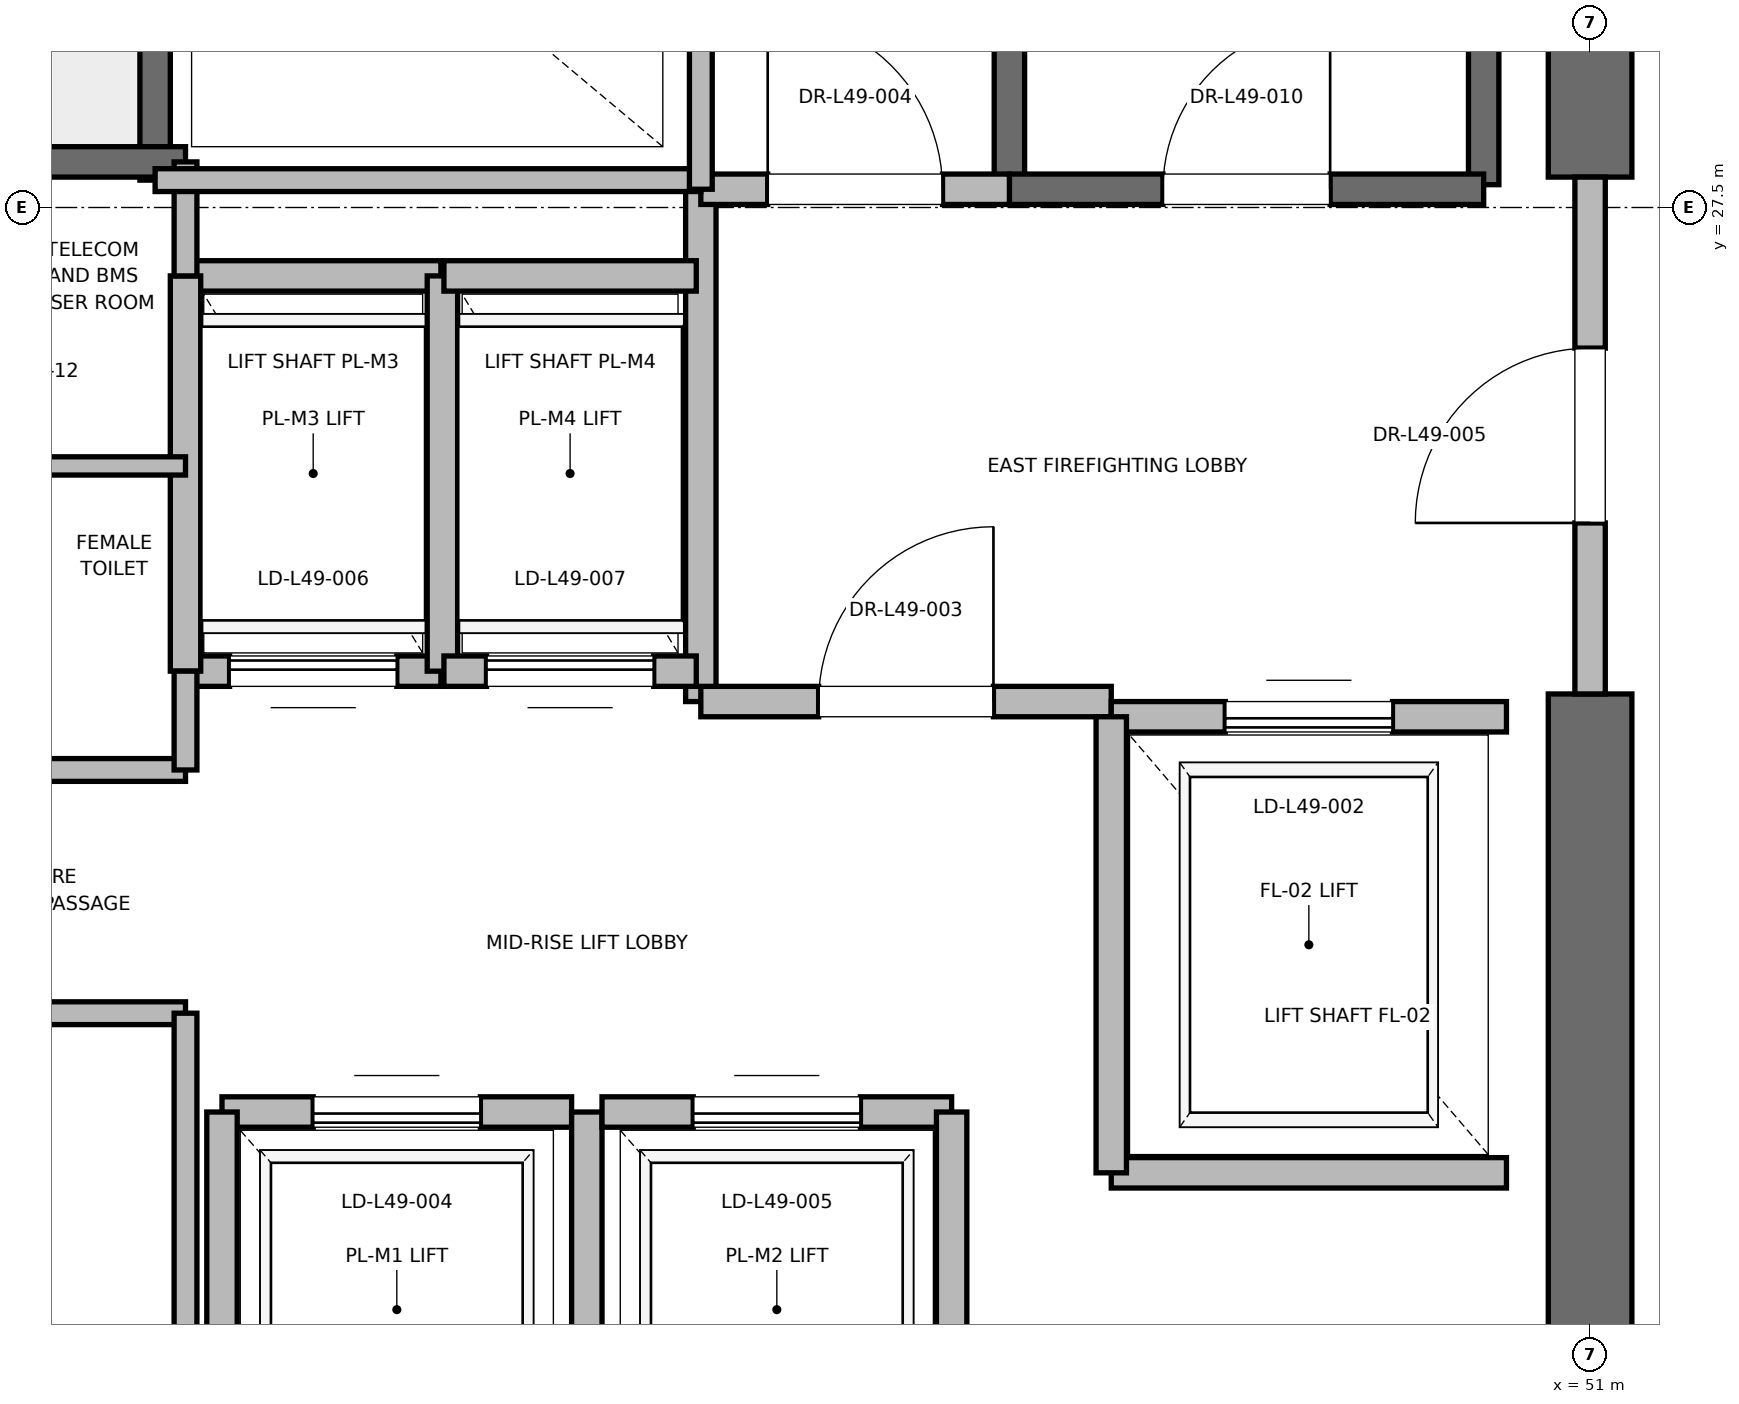
"""IFC4 building model, lengths in metres.
Left out: names, types, materials, properties, quantities, classifications, styles, units other than length and angle.
Written with IfcOpenShell. Run it as: python <this file> out.ifc"""

import sys

from ifc_helpers import new_model, si_unit, direction, frame, frame_2d, origin, place, context, subcontext, project, spatial, rectangle, extrude, element, fill, save


model = new_model("IFC4")
c1 = context("Model", 3, precision=1e-05, world=origin(), true_north=direction((0.0, 1.0)))
c2 = subcontext(c1, "Body", "Model", "MODEL_VIEW")
j1 = project(units=[si_unit("LENGTHUNIT", "METRE"), si_unit("PLANEANGLEUNIT", "RADIAN")], contexts=[c1])
p1 = place(None, origin())
s1 = spatial("IfcSite", under=j1, at=p1, CompositionType="ELEMENT")
p2 = place(p1, origin())
s2 = spatial("IfcBuilding", under=s1, at=p2, CompositionType="ELEMENT")
p3 = place(p2, frame((0.0, 0.0, 213.2)))
s3 = spatial("IfcBuildingStorey", under=s2, at=p3, CompositionType="ELEMENT", Elevation=213.2)
p4 = place(p3, frame((51.0, 18.5, 0.0), z_axis=(0.0, 0.0, 1.0), x_axis=(0.0, 1.0, 0.0)))
e1 = element("IfcWall", 1, at=p4, inside=s3, PredefinedType="SHEAR", context=c2, shape_type="SweptSolid", body=[
    extrude(rectangle(XDim=5.8, YDim=0.55, at=frame_2d((2.9, 0.0))), origin(), (0.0, 0.0, 1.0), 3.775),
])
p5 = place(p3, frame((51.0, 27.7, 0.0), z_axis=(0.0, 0.0, 1.0), x_axis=(0.0, 1.0, 0.0)))
e2 = element("IfcWall", 2, at=p5, inside=s3, PredefinedType="SHEAR", context=c2, shape_type="SweptSolid", body=[
    extrude(rectangle(XDim=8.8, YDim=0.55, at=frame_2d((4.4, 0.0))), origin(), (0.0, 0.0, 1.0), 3.775),
])
p6 = place(p3, frame((50.3, 27.65, 0.0), z_axis=(0.0, 0.0, 1.0), x_axis=(0.0, 1.0, 0.0)))
e3 = element("IfcWall", 3, at=p6, inside=s3, PredefinedType="SOLIDWALL", context=c2, shape_type="SweptSolid", body=[
    extrude(rectangle(XDim=8.15, YDim=0.2, at=frame_2d((4.075, 0.0))), origin(), (0.0, 0.0, 1.0), 3.775),
])
p7 = place(p3, frame((47.18, 27.62, 0.0), z_axis=(0.0, 0.0, 1.0), x_axis=(0.0, 1.0, 0.0)))
e4 = element("IfcWall", 4, at=p7, inside=s3, PredefinedType="SOLIDWALL", context=c2, shape_type="SweptSolid", body=[
    extrude(rectangle(XDim=8.18, YDim=0.2, at=frame_2d((4.09, 0.0))), origin(), (0.0, 0.0, 1.0), 3.775),
])
p8 = place(p3, frame((47.18, 27.62, 0.0), z_axis=(0.0, 0.0, 1.0), x_axis=(1.0, 0.0, 0.0)))
e5 = element("IfcWall", 5, at=p8, inside=s3, PredefinedType="SOLIDWALL", context=c2, shape_type="SweptSolid", body=[
    extrude(rectangle(XDim=3.12, YDim=0.2, at=frame_2d((1.56, 0.0))), origin(), (0.0, 0.0, 1.0), 3.775),
])
p9 = place(p8, frame((1.01, 0.0, 0.0)))
e6 = element("IfcOpeningElement", 6, at=p9, cuts=e5, PredefinedType="OPENING", context=c2, shape_type="SweptSolid", body=[
    extrude(rectangle(XDim=1.1, YDim=2.15, at=frame_2d((0.55, 1.075))), frame((0.0, 0.1, 0.0), z_axis=(0.0, -1.0, 0.0), x_axis=(1.0, 0.0, 0.0)), (0.0, 0.0, 1.0), 0.2),
])
p10 = place(p3, frame((41.56, 27.68, 0.0), z_axis=(0.0, 0.0, 1.0), x_axis=(0.0, 1.0, 0.0)))
e7 = element("IfcWall", 7, at=p10, inside=s3, PredefinedType="SOLIDWALL", context=c2, shape_type="SweptSolid", body=[
    extrude(rectangle(XDim=8.57, YDim=0.2, at=frame_2d((4.285, 0.0))), origin(), (0.0, 0.0, 1.0), 3.775),
])
p11 = place(p3, frame((38.44, 27.8, 0.0), z_axis=(0.0, 0.0, 1.0), x_axis=(1.0, 0.0, 0.0)))
e8 = element("IfcWall", 8, at=p11, inside=s3, PredefinedType="SOLIDWALL", context=c2, shape_type="SweptSolid", body=[
    extrude(rectangle(XDim=3.32, YDim=0.2, at=frame_2d((1.66, 0.0))), origin(), (0.0, 0.0, 1.0), 3.775),
])
p12 = place(p3, frame((45.15, 24.25, 0.0), z_axis=(0.0, 0.0, 1.0), x_axis=(0.0, 1.0, 0.0)))
e9 = element("IfcWall", 9, at=p12, inside=s3, PredefinedType="PARTITIONING", context=c2, shape_type="SweptSolid", body=[
    extrude(rectangle(XDim=3.37, YDim=0.2, at=frame_2d((1.685, 0.0))), origin(), (0.0, 0.0, 1.0), 3.775),
])
p13 = place(p3, frame((45.15, 24.25, 0.0), z_axis=(0.0, 0.0, 1.0), x_axis=(1.0, 0.0, 0.0)))
e10 = element("IfcWall", 10, at=p13, inside=s3, PredefinedType="PARTITIONING", context=c2, shape_type="SweptSolid", body=[
    extrude(rectangle(XDim=2.7, YDim=0.2, at=frame_2d((1.35, 0.0))), origin(), (0.0, 0.0, 1.0), 3.775),
])
p14 = place(p13, frame((0.775, 0.0, 0.0)))
e11 = element("IfcOpeningElement", 11, at=p14, cuts=e10, PredefinedType="OPENING", context=c2, shape_type="SweptSolid", body=[
    extrude(rectangle(XDim=1.15, YDim=2.2, at=frame_2d((0.575, 1.1))), frame((0.0, 0.1, 0.0), z_axis=(0.0, -1.0, 0.0), x_axis=(1.0, 0.0, 0.0)), (0.0, 0.0, 1.0), 0.2),
])
p15 = place(p3, frame((45.15, 27.62, 0.0), z_axis=(0.0, 0.0, 1.0), x_axis=(1.0, 0.0, 0.0)))
e12 = element("IfcWall", 12, at=p15, inside=s3, PredefinedType="PARTITIONING", context=c2, shape_type="SweptSolid", body=[
    extrude(rectangle(XDim=2.03, YDim=0.2, at=frame_2d((1.015, 0.0))), origin(), (0.0, 0.0, 1.0), 3.775),
])
p16 = place(p15, frame((0.44, 0.0, 0.0)))
e13 = element("IfcOpeningElement", 13, at=p16, cuts=e12, PredefinedType="OPENING", context=c2, shape_type="SweptSolid", body=[
    extrude(rectangle(XDim=1.15, YDim=2.2, at=frame_2d((0.575, 1.1))), frame((0.0, 0.1, 0.0), z_axis=(0.0, -1.0, 0.0), x_axis=(1.0, 0.0, 0.0)), (0.0, 0.0, 1.0), 0.2),
])
p17 = place(p3, frame((51.0, 24.3, 0.0), z_axis=(0.0, 0.0, 1.0), x_axis=(0.0, 1.0, 0.0)))
e14 = element("IfcWall", 14, at=p17, inside=s3, PredefinedType="PARTITIONING", context=c2, shape_type="SweptSolid", body=[
    extrude(rectangle(XDim=3.4, YDim=0.2, at=frame_2d((1.7, 0.0))), origin(), (0.0, 0.0, 1.0), 2.755),
])
p18 = place(p17, frame((1.125, 0.0, 0.0)))
e15 = element("IfcOpeningElement", 15, at=p18, cuts=e14, PredefinedType="OPENING", context=c2, shape_type="SweptSolid", body=[
    extrude(rectangle(XDim=1.15, YDim=2.2, at=frame_2d((0.575, 1.1))), frame((0.0, 0.1, 0.0), z_axis=(0.0, -1.0, 0.0), x_axis=(1.0, 0.0, 0.0)), (0.0, 0.0, 1.0), 0.2),
])
p19 = place(p3, frame((47.85, 21.15, 0.0), z_axis=(0.0, 0.0, 1.0), x_axis=(1.0, 0.0, 0.0)))
e16 = element("IfcWall", 16, at=p19, inside=s3, PredefinedType="SOLIDWALL", context=c2, shape_type="SweptSolid", body=[
    extrude(rectangle(XDim=2.6, YDim=0.2, at=frame_2d((1.3, 0.0))), origin(), (0.0, 0.0, 1.0), 3.775),
])
p20 = place(p3, frame((50.45, 24.15, 0.0), z_axis=(0.0, 0.0, 1.0), x_axis=(-1.0, 0.0, 0.0)))
e17 = element("IfcWall", 17, at=p20, inside=s3, PredefinedType="SOLIDWALL", context=c2, shape_type="SweptSolid", body=[
    extrude(rectangle(XDim=2.6, YDim=0.2, at=frame_2d((1.3, 0.0))), origin(), (0.0, 0.0, 1.0), 2.755),
])
p21 = place(p20, frame((0.75, 0.0, 0.0)))
e18 = element("IfcOpeningElement", 18, at=p21, cuts=e17, PredefinedType="OPENING", context=c2, shape_type="SweptSolid", body=[
    extrude(rectangle(XDim=1.1, YDim=2.2, at=frame_2d((0.55, 1.1))), frame((0.0, 0.1, 0.0), z_axis=(0.0, -1.0, 0.0), x_axis=(1.0, 0.0, 0.0)), (0.0, 0.0, 1.0), 0.2),
])
p22 = place(p3, frame((47.85, 24.15, 0.0), z_axis=(0.0, 0.0, 1.0), x_axis=(0.0, -1.0, 0.0)))
e19 = element("IfcWall", 19, at=p22, inside=s3, PredefinedType="SOLIDWALL", context=c2, shape_type="SweptSolid", body=[
    extrude(rectangle(XDim=3.0, YDim=0.2, at=frame_2d((1.5, 0.0))), origin(), (0.0, 0.0, 1.0), 3.775),
])
p23 = place(p3, frame((44.3, 21.55, 0.0), z_axis=(0.0, 0.0, 1.0), x_axis=(-1.0, 0.0, 0.0)))
e20 = element("IfcWall", 20, at=p23, inside=s3, PredefinedType="SOLIDWALL", context=c2, shape_type="SweptSolid", body=[
    extrude(rectangle(XDim=2.3, YDim=0.2, at=frame_2d((1.15, 0.0))), origin(), (0.0, 0.0, 1.0), 3.775),
])
p24 = place(p23, frame((0.6, 0.0, 0.0)))
e21 = element("IfcOpeningElement", 21, at=p24, cuts=e20, PredefinedType="OPENING", context=c2, shape_type="SweptSolid", body=[
    extrude(rectangle(XDim=1.1, YDim=2.2, at=frame_2d((0.55, 1.1))), frame((0.0, 0.1, 0.0), z_axis=(0.0, -1.0, 0.0), x_axis=(1.0, 0.0, 0.0)), (0.0, 0.0, 1.0), 0.2),
])
p25 = place(p3, frame((42.0, 21.55, 0.0), z_axis=(0.0, 0.0, 1.0), x_axis=(0.0, -1.0, 0.0)))
e22 = element("IfcWall", 22, at=p25, inside=s3, PredefinedType="SOLIDWALL", context=c2, shape_type="SweptSolid", body=[
    extrude(rectangle(XDim=2.6, YDim=0.2, at=frame_2d((1.3, 0.0))), origin(), (0.0, 0.0, 1.0), 2.755),
])
p26 = place(p3, frame((44.4, 18.95, 0.0), z_axis=(0.0, 0.0, 1.0), x_axis=(0.0, 1.0, 0.0)))
e23 = element("IfcWall", 23, at=p26, inside=s3, PredefinedType="SOLIDWALL", context=c2, shape_type="SweptSolid", body=[
    extrude(rectangle(XDim=2.6, YDim=0.2, at=frame_2d((1.3, 0.0))), origin(), (0.0, 0.0, 1.0), 3.775),
])
p27 = place(p3, frame((46.8, 21.55, 0.0), z_axis=(0.0, 0.0, 1.0), x_axis=(-1.0, 0.0, 0.0)))
e24 = element("IfcWall", 24, at=p27, inside=s3, PredefinedType="SOLIDWALL", context=c2, shape_type="SweptSolid", body=[
    extrude(rectangle(XDim=2.3, YDim=0.2, at=frame_2d((1.15, 0.0))), origin(), (0.0, 0.0, 1.0), 3.775),
])
p28 = place(p27, frame((0.6, 0.0, 0.0)))
e25 = element("IfcOpeningElement", 25, at=p28, cuts=e24, PredefinedType="OPENING", context=c2, shape_type="SweptSolid", body=[
    extrude(rectangle(XDim=1.1, YDim=2.2, at=frame_2d((0.55, 1.1))), frame((0.0, 0.1, 0.0), z_axis=(0.0, -1.0, 0.0), x_axis=(1.0, 0.0, 0.0)), (0.0, 0.0, 1.0), 0.2),
])
p29 = place(p3, frame((46.8, 18.95, 0.0), z_axis=(0.0, 0.0, 1.0), x_axis=(0.0, 1.0, 0.0)))
e26 = element("IfcWall", 26, at=p29, inside=s3, PredefinedType="SOLIDWALL", context=c2, shape_type="SweptSolid", body=[
    extrude(rectangle(XDim=2.6, YDim=0.2, at=frame_2d((1.3, 0.0))), origin(), (0.0, 0.0, 1.0), 3.775),
])
p30 = place(p3, frame((41.76, 24.45, 0.0), z_axis=(0.0, 0.0, 1.0), x_axis=(1.0, 0.0, 0.0)))
e27 = element("IfcWall", 27, at=p30, inside=s3, PredefinedType="SOLIDWALL", context=c2, shape_type="SweptSolid", body=[
    extrude(rectangle(XDim=1.68, YDim=0.2, at=frame_2d((0.84, 0.0))), origin(), (0.0, 0.0, 1.0), 3.775),
])
p31 = place(p30, frame((0.29, 0.0, 0.0)))
e28 = element("IfcOpeningElement", 28, at=p31, cuts=e27, PredefinedType="OPENING", context=c2, shape_type="SweptSolid", body=[
    extrude(rectangle(XDim=1.1, YDim=2.2, at=frame_2d((0.55, 1.1))), frame((0.0, 0.1, 0.0), z_axis=(0.0, -1.0, 0.0), x_axis=(1.0, 0.0, 0.0)), (0.0, 0.0, 1.0), 0.2),
])
p32 = place(p3, frame((43.44, 27.05, 0.0), z_axis=(0.0, 0.0, 1.0), x_axis=(-1.0, 0.0, 0.0)))
e29 = element("IfcWall", 29, at=p32, inside=s3, PredefinedType="SOLIDWALL", context=c2, shape_type="SweptSolid", body=[
    extrude(rectangle(XDim=1.68, YDim=0.2, at=frame_2d((0.84, 0.0))), origin(), (0.0, 0.0, 1.0), 3.775),
])
for number, where, z_axis, x_axis in (
    (30, (41.76, 27.05, 0.0), (0.0, 0.0, 1.0), (0.0, -1.0, 0.0)),
    (31, (43.45, 24.45, 0.0), (0.0, 0.0, 1.0), (0.0, 1.0, 0.0)),
):
    element("IfcWall", number, at=place(p3, frame(where, z_axis=z_axis, x_axis=x_axis)), inside=s3, PredefinedType="SOLIDWALL", context=c2, shape_type="SweptSolid", body=[
        extrude(rectangle(XDim=2.6, YDim=0.2, at=frame_2d((1.3, 0.0))), origin(), (0.0, 0.0, 1.0), 3.775),
    ])
p33 = place(p3, frame((43.46, 24.45, 0.0), z_axis=(0.0, 0.0, 1.0), x_axis=(1.0, 0.0, 0.0)))
e32 = element("IfcWall", 32, at=p33, inside=s3, PredefinedType="SOLIDWALL", context=c2, shape_type="SweptSolid", body=[
    extrude(rectangle(XDim=1.66, YDim=0.2, at=frame_2d((0.83, 0.0))), origin(), (0.0, 0.0, 1.0), 3.775),
])
p34 = place(p33, frame((0.28, 0.0, 0.0)))
e33 = element("IfcOpeningElement", 33, at=p34, cuts=e32, PredefinedType="OPENING", context=c2, shape_type="SweptSolid", body=[
    extrude(rectangle(XDim=1.1, YDim=2.2, at=frame_2d((0.55, 1.1))), frame((0.0, 0.1, 0.0), z_axis=(0.0, -1.0, 0.0), x_axis=(1.0, 0.0, 0.0)), (0.0, 0.0, 1.0), 0.2),
])
p35 = place(p3, frame((45.12, 27.05, 0.0), z_axis=(0.0, 0.0, 1.0), x_axis=(-1.0, 0.0, 0.0)))
e34 = element("IfcWall", 34, at=p35, inside=s3, PredefinedType="SOLIDWALL", context=c2, shape_type="SweptSolid", body=[
    extrude(rectangle(XDim=1.66, YDim=0.2, at=frame_2d((0.83, 0.0))), origin(), (0.0, 0.0, 1.0), 3.775),
])
for number, where, z_axis, x_axis in (
    (35, (39.95, 22.2, 0.0), (0.0, 0.0, 1.0), (1.0, 0.0, 0.0)),
    (36, (39.95, 23.8, 0.0), (0.0, 0.0, 1.0), (1.0, 0.0, 0.0)),
):
    element("IfcWall", number, at=place(p3, frame(where, z_axis=z_axis, x_axis=x_axis)), inside=s3, PredefinedType="PARTITIONING", context=c2, shape_type="SweptSolid", body=[
        extrude(rectangle(XDim=1.81, YDim=0.15, at=frame_2d((0.905, 0.0))), origin(), (0.0, 0.0, 1.0), 2.85),
    ])
p36 = place(p3, frame((39.95, 25.8, 0.0), z_axis=(0.0, 0.0, 1.0), x_axis=(1.0, 0.0, 0.0)))
e37 = element("IfcWall", 37, at=p36, inside=s3, PredefinedType="PARTITIONING", context=c2, shape_type="SweptSolid", body=[
    extrude(rectangle(XDim=1.81, YDim=0.12, at=frame_2d((0.905, 0.0))), origin(), (0.0, 0.0, 1.0), 2.85),
])
p37 = place(p3, frame((41.76, 18.6, 0.0), z_axis=(0.0, 0.0, 1.0), x_axis=(0.0, 1.0, 0.0)))
e38 = element("IfcWall", 38, at=p37, inside=s3, PredefinedType="PARTITIONING", context=c2, shape_type="SweptSolid", body=[
    extrude(rectangle(XDim=3.6, YDim=0.15, at=frame_2d((1.8, 0.0))), origin(), (0.0, 0.0, 1.0), 2.755),
])
p38 = place(p3, frame((41.76, 23.8, 0.0), z_axis=(0.0, 0.0, 1.0), x_axis=(0.0, 1.0, 0.0)))
e39 = element("IfcWall", 39, at=p38, inside=s3, PredefinedType="PARTITIONING", context=c2, shape_type="SweptSolid", body=[
    extrude(rectangle(XDim=0.65, YDim=0.15, at=frame_2d((0.325, 0.0))), origin(), (0.0, 0.0, 1.0), 2.85),
])
p39 = place(p3, frame((41.76, 27.05, 0.0), z_axis=(0.0, 0.0, 1.0), x_axis=(0.0, 1.0, 0.0)))
e40 = element("IfcWall", 40, at=p39, inside=s3, PredefinedType="PARTITIONING", context=c2, shape_type="SweptSolid", body=[
    extrude(rectangle(XDim=0.75, YDim=0.15, at=frame_2d((0.375, 0.0))), origin(), (0.0, 0.0, 1.0), 2.85),
])
p40 = place(p3, frame((41.56, 27.68, 0.0), z_axis=(0.0, 0.0, 1.0), x_axis=(1.0, 0.0, 0.0)))
e41 = element("IfcWall", 41, at=p40, inside=s3, PredefinedType="PARTITIONING", context=c2, shape_type="SweptSolid", body=[
    extrude(rectangle(XDim=3.59, YDim=0.15, at=frame_2d((1.795, 0.0))), origin(), (0.0, 0.0, 1.0), 2.85),
])
p41 = place(p3, frame((45.15, 27.62, 0.0), z_axis=(0.0, 0.0, 1.0), x_axis=(0.0, 1.0, 0.0)))
e42 = element("IfcWall", 42, at=p41, inside=s3, PredefinedType="PARTITIONING", context=c2, shape_type="SweptSolid", body=[
    extrude(rectangle(XDim=3.1, YDim=0.15, at=frame_2d((1.55, 0.0))), origin(), (0.0, 0.0, 1.0), 2.85),
])
p42 = place(p9, origin())
e43 = element("IfcDoor", 43, at=p42, inside=s3, OperationType="SINGLE_SWING_RIGHT", PredefinedType="DOOR", context=c2, shape_type="SweptSolid", body=[
    extrude(rectangle(XDim=1.1, YDim=2.15, at=frame_2d((0.55, 1.075))), frame((0.0, 0.025, 0.0), z_axis=(0.0, -1.0, 0.0), x_axis=(1.0, 0.0, 0.0)), (0.0, 0.0, 1.0), 0.05),
])
fill(e6, e43)
p43 = place(p14, origin())
e44 = element("IfcDoor", 44, at=p43, inside=s3, OperationType="SINGLE_SWING_RIGHT", PredefinedType="DOOR", context=c2, shape_type="SweptSolid", body=[
    extrude(rectangle(XDim=1.15, YDim=2.2, at=frame_2d((0.575, 1.1))), frame((0.0, 0.025, 0.0), z_axis=(0.0, -1.0, 0.0), x_axis=(1.0, 0.0, 0.0)), (0.0, 0.0, 1.0), 0.05),
])
fill(e11, e44)
p44 = place(p16, origin())
e45 = element("IfcDoor", 45, at=p44, inside=s3, OperationType="SINGLE_SWING_LEFT", PredefinedType="DOOR", context=c2, shape_type="SweptSolid", body=[
    extrude(rectangle(XDim=1.15, YDim=2.2, at=frame_2d((0.575, 1.1))), frame((0.0, 0.025, 0.0), z_axis=(0.0, -1.0, 0.0), x_axis=(1.0, 0.0, 0.0)), (0.0, 0.0, 1.0), 0.05),
])
fill(e13, e45)
p45 = place(p18, origin())
e46 = element("IfcDoor", 46, at=p45, inside=s3, OperationType="SINGLE_SWING_LEFT", PredefinedType="DOOR", context=c2, shape_type="SweptSolid", body=[
    extrude(rectangle(XDim=1.15, YDim=2.2, at=frame_2d((0.575, 1.1))), frame((0.0, 0.025, 0.0), z_axis=(0.0, -1.0, 0.0), x_axis=(1.0, 0.0, 0.0)), (0.0, 0.0, 1.0), 0.05),
])
fill(e15, e46)
p46 = place(p21, origin())
e47 = element("IfcDoor", 47, at=p46, inside=s3, OperationType="SLIDING_TO_RIGHT", PredefinedType="DOOR", context=c2, shape_type="SweptSolid", body=[
    extrude(rectangle(XDim=1.1, YDim=2.2, at=frame_2d((0.55, 1.1))), frame((0.0, 0.025, 0.0), z_axis=(0.0, -1.0, 0.0), x_axis=(1.0, 0.0, 0.0)), (0.0, 0.0, 1.0), 0.05),
])
fill(e18, e47)
p47 = place(p24, origin())
e48 = element("IfcDoor", 48, at=p47, inside=s3, OperationType="SLIDING_TO_RIGHT", PredefinedType="DOOR", context=c2, shape_type="SweptSolid", body=[
    extrude(rectangle(XDim=1.1, YDim=2.2, at=frame_2d((0.55, 1.1))), frame((0.0, 0.025, 0.0), z_axis=(0.0, -1.0, 0.0), x_axis=(1.0, 0.0, 0.0)), (0.0, 0.0, 1.0), 0.05),
])
fill(e21, e48)
p48 = place(p28, origin())
e49 = element("IfcDoor", 49, at=p48, inside=s3, OperationType="SLIDING_TO_RIGHT", PredefinedType="DOOR", context=c2, shape_type="SweptSolid", body=[
    extrude(rectangle(XDim=1.1, YDim=2.2, at=frame_2d((0.55, 1.1))), frame((0.0, 0.025, 0.0), z_axis=(0.0, -1.0, 0.0), x_axis=(1.0, 0.0, 0.0)), (0.0, 0.0, 1.0), 0.05),
])
fill(e25, e49)
p49 = place(p31, origin())
e50 = element("IfcDoor", 50, at=p49, inside=s3, OperationType="SLIDING_TO_RIGHT", PredefinedType="DOOR", context=c2, shape_type="SweptSolid", body=[
    extrude(rectangle(XDim=1.1, YDim=2.2, at=frame_2d((0.55, 1.1))), frame((0.0, 0.025, 0.0), z_axis=(0.0, -1.0, 0.0), x_axis=(1.0, 0.0, 0.0)), (0.0, 0.0, 1.0), 0.05),
])
fill(e28, e50)
p50 = place(p34, origin())
e51 = element("IfcDoor", 51, at=p50, inside=s3, OperationType="SLIDING_TO_RIGHT", PredefinedType="DOOR", context=c2, shape_type="SweptSolid", body=[
    extrude(rectangle(XDim=1.1, YDim=2.2, at=frame_2d((0.55, 1.1))), frame((0.0, 0.025, 0.0), z_axis=(0.0, -1.0, 0.0), x_axis=(1.0, 0.0, 0.0)), (0.0, 0.0, 1.0), 0.05),
])
fill(e33, e51)
save(model, sys.argv[1])
